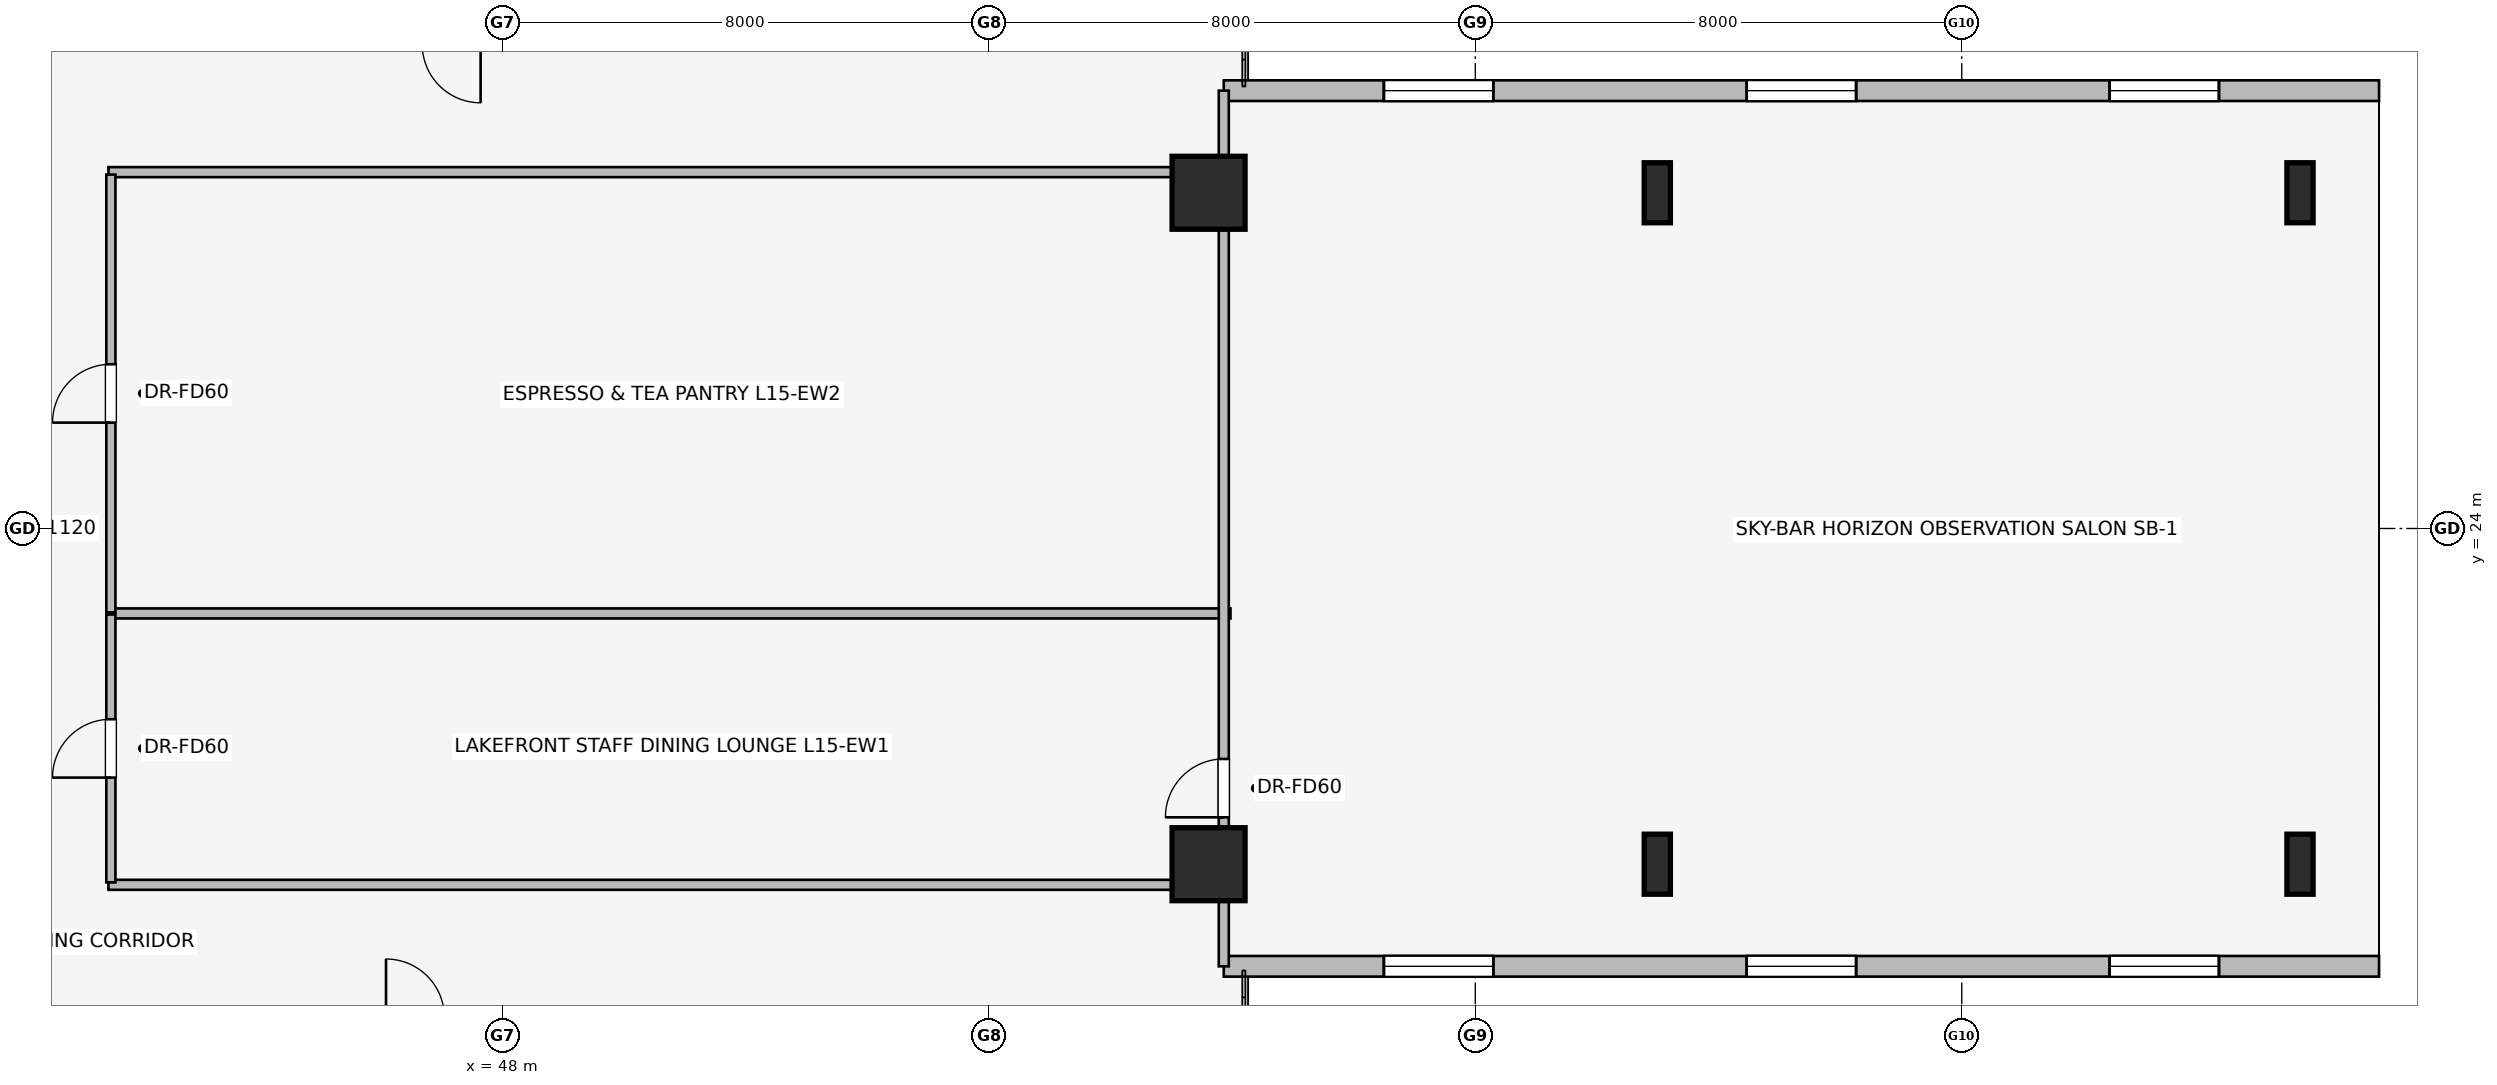
"""IFC4 building model, lengths in metres.
Left out: names, types, materials, properties, quantities, classifications, styles, units other than length and angle.
Written with IfcOpenShell. Run it as: python <this file> out.ifc"""

import sys

from ifc_helpers import new_model, si_unit, direction, frame, frame_2d, origin, origin_2d, place, context, subcontext, project, spatial, rectangle, i_section, extrude, element, fill, save


model = new_model("IFC4")
c1 = context("Model", 3, precision=1e-05, world=origin(), true_north=direction((0.0, 1.0)))
c2 = subcontext(c1, "Body", "Model", "MODEL_VIEW")
j1 = project(units=[si_unit("LENGTHUNIT", "METRE"), si_unit("PLANEANGLEUNIT", "RADIAN")], contexts=[c1])
p1 = place(None, origin())
s1 = spatial("IfcSite", under=j1, at=p1, CompositionType="ELEMENT")
p2 = place(p1, origin())
s2 = spatial("IfcBuilding", under=s1, at=p2, CompositionType="ELEMENT")
p3 = place(p2, frame((0.0, 0.0, 59.85)))
s3 = spatial("IfcBuildingStorey", under=s2, at=p3, CompositionType="ELEMENT", Elevation=59.85)
for number, where, z_axis, x_axis in (
    (1, (59.613, 18.479, 0.0), (0.0, 0.0, 1.0), (1.0, 0.0, 0.0)),
    (2, (59.613, 29.521, 0.0), (0.0, 0.0, 1.0), (1.0, 0.0, 0.0)),
):
    element("IfcColumn", number, at=place(p3, frame(where, z_axis=z_axis, x_axis=x_axis)), inside=s3, PredefinedType="COLUMN", context=c2, shape_type="SweptSolid", body=[
        extrude(rectangle(XDim=1.2, YDim=1.2, at=origin_2d()), origin(), (0.0, 0.0, 1.0), 3.65),
    ])
for number, where, z_axis, x_axis in (
    (3, (66.993, 18.479, 0.0), (0.0, 0.0, 1.0), (1.0, 0.0, 0.0)),
    (4, (66.993, 29.521, 0.0), (0.0, 0.0, 1.0), (1.0, 0.0, 0.0)),
    (5, (77.563, 18.479, 0.0), (0.0, 0.0, 1.0), (1.0, 0.0, 0.0)),
    (6, (77.563, 29.521, 0.0), (0.0, 0.0, 1.0), (1.0, 0.0, 0.0)),
):
    element("IfcColumn", number, at=place(p3, frame(where, z_axis=z_axis, x_axis=x_axis)), inside=s3, PredefinedType="COLUMN", context=c2, shape_type="SweptSolid", body=[
        extrude(i_section(OverallWidth=0.431, OverallDepth=0.987, WebThickness=0.034, FlangeThickness=0.062, at=origin_2d()), origin(), (0.0, 0.0, 1.0), 3.65),
    ])
p4 = place(p3, frame((78.863, 16.8, 0.0), z_axis=(0.0, 0.0, 1.0), x_axis=(-1.0, 0.0, 0.0)))
e7 = element("IfcWall", 7, at=p4, inside=s3, PredefinedType="STANDARD", context=c2, shape_type="SweptSolid", body=[
    extrude(rectangle(XDim=19.0, YDim=0.34, at=frame_2d((9.5, 0.0))), origin(), (0.0, 0.0, 1.0), 3.39),
])
p5 = place(p4, frame((2.633, 0.0, 0.75)))
e8 = element("IfcOpeningElement", 8, at=p5, cuts=e7, PredefinedType="OPENING", context=c2, shape_type="SweptSolid", body=[
    extrude(rectangle(XDim=1.8, YDim=1.5, at=frame_2d((0.9, 0.75))), frame((0.0, 0.18, 0.0), z_axis=(0.0, -1.0, 0.0), x_axis=(1.0, 0.0, 0.0)), (0.0, 0.0, 1.0), 0.36),
])
p6 = place(p4, frame((8.6, 0.0, 0.75)))
e9 = element("IfcOpeningElement", 9, at=p6, cuts=e7, PredefinedType="OPENING", context=c2, shape_type="SweptSolid", body=[
    extrude(rectangle(XDim=1.8, YDim=1.5, at=frame_2d((0.9, 0.75))), frame((0.0, 0.18, 0.0), z_axis=(0.0, -1.0, 0.0), x_axis=(1.0, 0.0, 0.0)), (0.0, 0.0, 1.0), 0.36),
])
p7 = place(p4, frame((14.567, 0.0, 0.75)))
e10 = element("IfcOpeningElement", 10, at=p7, cuts=e7, PredefinedType="OPENING", context=c2, shape_type="SweptSolid", body=[
    extrude(rectangle(XDim=1.8, YDim=1.5, at=frame_2d((0.9, 0.75))), frame((0.0, 0.18, 0.0), z_axis=(0.0, -1.0, 0.0), x_axis=(1.0, 0.0, 0.0)), (0.0, 0.0, 1.0), 0.36),
])
p8 = place(p3, frame((59.863, 31.2, 0.0), z_axis=(0.0, 0.0, 1.0), x_axis=(1.0, 0.0, 0.0)))
e11 = element("IfcWall", 11, at=p8, inside=s3, PredefinedType="STANDARD", context=c2, shape_type="SweptSolid", body=[
    extrude(rectangle(XDim=19.0, YDim=0.34, at=frame_2d((9.5, 0.0))), origin(), (0.0, 0.0, 1.0), 3.39),
])
p9 = place(p8, frame((2.633, 0.0, 0.75)))
e12 = element("IfcOpeningElement", 12, at=p9, cuts=e11, PredefinedType="OPENING", context=c2, shape_type="SweptSolid", body=[
    extrude(rectangle(XDim=1.8, YDim=1.5, at=frame_2d((0.9, 0.75))), frame((0.0, 0.18, 0.0), z_axis=(0.0, -1.0, 0.0), x_axis=(1.0, 0.0, 0.0)), (0.0, 0.0, 1.0), 0.36),
])
p10 = place(p8, frame((8.6, 0.0, 0.75)))
e13 = element("IfcOpeningElement", 13, at=p10, cuts=e11, PredefinedType="OPENING", context=c2, shape_type="SweptSolid", body=[
    extrude(rectangle(XDim=1.8, YDim=1.5, at=frame_2d((0.9, 0.75))), frame((0.0, 0.18, 0.0), z_axis=(0.0, -1.0, 0.0), x_axis=(1.0, 0.0, 0.0)), (0.0, 0.0, 1.0), 0.36),
])
p11 = place(p8, frame((14.567, 0.0, 0.75)))
e14 = element("IfcOpeningElement", 14, at=p11, cuts=e11, PredefinedType="OPENING", context=c2, shape_type="SweptSolid", body=[
    extrude(rectangle(XDim=1.8, YDim=1.5, at=frame_2d((0.9, 0.75))), frame((0.0, 0.18, 0.0), z_axis=(0.0, -1.0, 0.0), x_axis=(1.0, 0.0, 0.0)), (0.0, 0.0, 1.0), 0.36),
])
for number, where, z_axis, x_axis in (
    (15, (41.52, 18.14, 0.0), (0.0, 0.0, 1.0), (1.0, 0.0, 0.0)),
    (16, (41.52, 29.86, 0.0), (0.0, 0.0, 1.0), (1.0, 0.0, 0.0)),
):
    element("IfcWall", number, at=place(p3, frame(where, z_axis=z_axis, x_axis=x_axis)), inside=s3, PredefinedType="PARTITIONING", context=c2, shape_type="SweptSolid", body=[
        extrude(rectangle(XDim=18.453, YDim=0.165, at=frame_2d((9.227, 0.0))), origin(), (0.0, 0.0, 1.0), 2.488),
    ])
p12 = place(p3, frame((41.59, 22.603, 0.0), z_axis=(0.0, 0.0, 1.0), x_axis=(1.0, 0.0, 0.0)))
e17 = element("IfcWall", 17, at=p12, inside=s3, PredefinedType="PARTITIONING", context=c2, shape_type="SweptSolid", body=[
    extrude(rectangle(XDim=18.383, YDim=0.165, at=frame_2d((9.191, 0.0))), origin(), (0.0, 0.0, 1.0), 2.902),
])
p13 = place(p3, frame((41.56, 18.18, 0.0), z_axis=(0.0, 0.0, 1.0), x_axis=(0.0, 1.0, 0.0)))
e18 = element("IfcWall", 18, at=p13, inside=s3, PredefinedType="PARTITIONING", context=c2, shape_type="SweptSolid", body=[
    extrude(rectangle(XDim=4.405, YDim=0.15, at=frame_2d((2.203, 0.0))), origin(), (0.0, 0.0, 1.0), 3.39),
])
p14 = place(p13, frame((1.723, 0.0, 0.0)))
e19 = element("IfcOpeningElement", 19, at=p14, cuts=e18, PredefinedType="OPENING", context=c2, shape_type="SweptSolid", body=[
    extrude(rectangle(XDim=0.96, YDim=2.0, at=frame_2d((0.48, 1.0))), frame((0.0, 0.085, 0.0), z_axis=(0.0, -1.0, 0.0), x_axis=(1.0, 0.0, 0.0)), (0.0, 0.0, 1.0), 0.17),
])
p15 = place(p3, frame((41.56, 22.621, 0.0), z_axis=(0.0, 0.0, 1.0), x_axis=(0.0, 1.0, 0.0)))
e20 = element("IfcWall", 20, at=p15, inside=s3, PredefinedType="PARTITIONING", context=c2, shape_type="SweptSolid", body=[
    extrude(rectangle(XDim=7.199, YDim=0.15, at=frame_2d((3.6, 0.0))), origin(), (0.0, 0.0, 1.0), 3.39),
])
p16 = place(p15, frame((3.12, 0.0, 0.0)))
e21 = element("IfcOpeningElement", 21, at=p16, cuts=e20, PredefinedType="OPENING", context=c2, shape_type="SweptSolid", body=[
    extrude(rectangle(XDim=0.96, YDim=2.0, at=frame_2d((0.48, 1.0))), frame((0.0, 0.085, 0.0), z_axis=(0.0, -1.0, 0.0), x_axis=(1.0, 0.0, 0.0)), (0.0, 0.0, 1.0), 0.17),
])
p17 = place(p3, frame((59.863, 16.8, 0.0), z_axis=(0.0, 0.0, 1.0), x_axis=(0.0, 1.0, 0.0)))
e22 = element("IfcWall", 22, at=p17, inside=s3, PredefinedType="PARTITIONING", context=c2, shape_type="SweptSolid", body=[
    extrude(rectangle(XDim=14.4, YDim=0.165, at=frame_2d((7.2, 0.0))), origin(), (0.0, 0.0, 1.0), 2.684),
])
p18 = place(p17, frame((2.45, 0.0, 0.0)))
e23 = element("IfcOpeningElement", 23, at=p18, cuts=e22, PredefinedType="OPENING", context=c2, shape_type="SweptSolid", body=[
    extrude(rectangle(XDim=0.96, YDim=2.0, at=frame_2d((0.48, 1.0))), frame((0.0, 0.093, 0.0), z_axis=(0.0, -1.0, 0.0), x_axis=(1.0, 0.0, 0.0)), (0.0, 0.0, 1.0), 0.185),
])
p19 = place(p5, origin())
e24 = element("IfcWindow", 24, at=p19, inside=s3, PartitioningType="SINGLE_PANEL", PredefinedType="WINDOW", context=c2, shape_type="SweptSolid", body=[
    extrude(rectangle(XDim=1.8, YDim=1.5, at=frame_2d((0.9, 0.75))), frame((0.0, 0.03, 0.0), z_axis=(0.0, -1.0, 0.0), x_axis=(1.0, 0.0, 0.0)), (0.0, 0.0, 1.0), 0.06),
])
fill(e8, e24)
p20 = place(p6, origin())
e25 = element("IfcWindow", 25, at=p20, inside=s3, PartitioningType="SINGLE_PANEL", PredefinedType="WINDOW", context=c2, shape_type="SweptSolid", body=[
    extrude(rectangle(XDim=1.8, YDim=1.5, at=frame_2d((0.9, 0.75))), frame((0.0, 0.03, 0.0), z_axis=(0.0, -1.0, 0.0), x_axis=(1.0, 0.0, 0.0)), (0.0, 0.0, 1.0), 0.06),
])
fill(e9, e25)
p21 = place(p7, origin())
e26 = element("IfcWindow", 26, at=p21, inside=s3, PartitioningType="SINGLE_PANEL", PredefinedType="WINDOW", context=c2, shape_type="SweptSolid", body=[
    extrude(rectangle(XDim=1.8, YDim=1.5, at=frame_2d((0.9, 0.75))), frame((0.0, 0.03, 0.0), z_axis=(0.0, -1.0, 0.0), x_axis=(1.0, 0.0, 0.0)), (0.0, 0.0, 1.0), 0.06),
])
fill(e10, e26)
p22 = place(p9, origin())
e27 = element("IfcWindow", 27, at=p22, inside=s3, PartitioningType="SINGLE_PANEL", PredefinedType="WINDOW", context=c2, shape_type="SweptSolid", body=[
    extrude(rectangle(XDim=1.8, YDim=1.5, at=frame_2d((0.9, 0.75))), frame((0.0, 0.03, 0.0), z_axis=(0.0, -1.0, 0.0), x_axis=(1.0, 0.0, 0.0)), (0.0, 0.0, 1.0), 0.06),
])
fill(e12, e27)
p23 = place(p10, origin())
e28 = element("IfcWindow", 28, at=p23, inside=s3, PartitioningType="SINGLE_PANEL", PredefinedType="WINDOW", context=c2, shape_type="SweptSolid", body=[
    extrude(rectangle(XDim=1.8, YDim=1.5, at=frame_2d((0.9, 0.75))), frame((0.0, 0.03, 0.0), z_axis=(0.0, -1.0, 0.0), x_axis=(1.0, 0.0, 0.0)), (0.0, 0.0, 1.0), 0.06),
])
fill(e13, e28)
p24 = place(p11, origin())
e29 = element("IfcWindow", 29, at=p24, inside=s3, PartitioningType="SINGLE_PANEL", PredefinedType="WINDOW", context=c2, shape_type="SweptSolid", body=[
    extrude(rectangle(XDim=1.8, YDim=1.5, at=frame_2d((0.9, 0.75))), frame((0.0, 0.03, 0.0), z_axis=(0.0, -1.0, 0.0), x_axis=(1.0, 0.0, 0.0)), (0.0, 0.0, 1.0), 0.06),
])
fill(e14, e29)
p25 = place(p14, origin())
e30 = element("IfcDoor", 30, at=p25, inside=s3, OperationType="SINGLE_SWING_LEFT", PredefinedType="DOOR", context=c2, shape_type="SweptSolid", body=[
    extrude(rectangle(XDim=0.96, YDim=2.0, at=frame_2d((0.48, 1.0))), frame((0.0, 0.025, 0.0), z_axis=(0.0, -1.0, 0.0), x_axis=(1.0, 0.0, 0.0)), (0.0, 0.0, 1.0), 0.05),
])
fill(e19, e30)
p26 = place(p16, origin())
e31 = element("IfcDoor", 31, at=p26, inside=s3, OperationType="SINGLE_SWING_LEFT", PredefinedType="DOOR", context=c2, shape_type="SweptSolid", body=[
    extrude(rectangle(XDim=0.96, YDim=2.0, at=frame_2d((0.48, 1.0))), frame((0.0, 0.025, 0.0), z_axis=(0.0, -1.0, 0.0), x_axis=(1.0, 0.0, 0.0)), (0.0, 0.0, 1.0), 0.05),
])
fill(e21, e31)
p27 = place(p18, origin())
e32 = element("IfcDoor", 32, at=p27, inside=s3, OperationType="SINGLE_SWING_LEFT", PredefinedType="DOOR", context=c2, shape_type="SweptSolid", body=[
    extrude(rectangle(XDim=0.96, YDim=2.0, at=frame_2d((0.48, 1.0))), frame((0.0, 0.025, 0.0), z_axis=(0.0, -1.0, 0.0), x_axis=(1.0, 0.0, 0.0)), (0.0, 0.0, 1.0), 0.05),
])
fill(e23, e32)
save(model, sys.argv[1])
